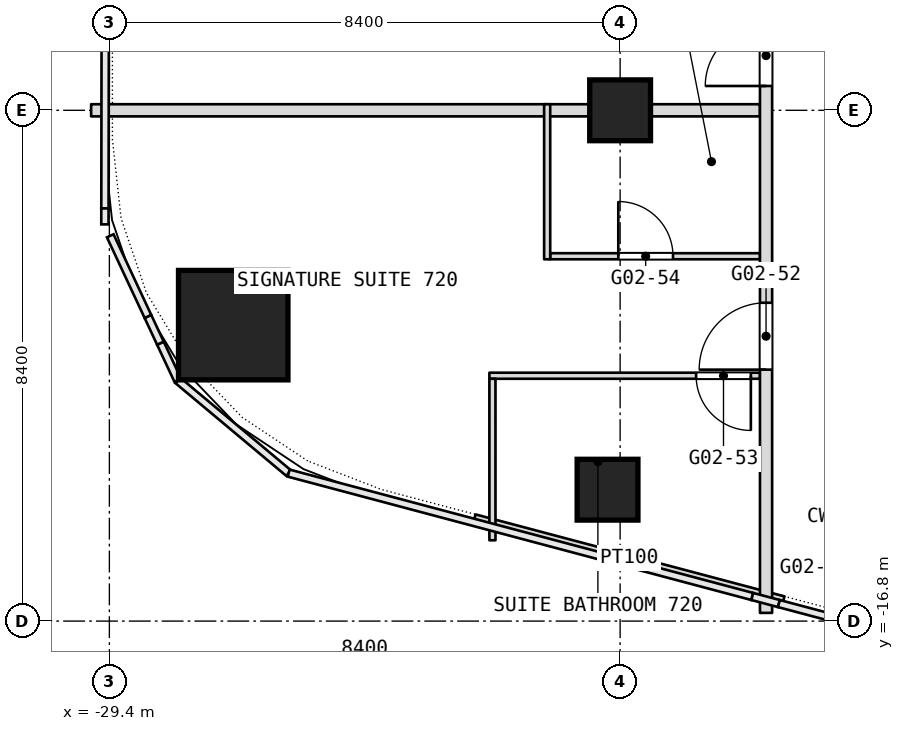
"""IFC4 building model, lengths in metres.
Left out: names, types, materials, properties, quantities, classifications, styles, units other than length and angle.
Written with IfcOpenShell. Run it as: python <this file> out.ifc"""

import sys

from ifc_helpers import new_model, si_unit, direction, frame, frame_2d, origin, origin_2d, place, context, subcontext, project, spatial, rectangle, extrude, element, fill, save


model = new_model("IFC4")
c1 = context("Model", 3, precision=1e-05, world=origin(), true_north=direction((0.0, 1.0)))
c2 = subcontext(c1, "Body", "Model", "MODEL_VIEW")
j1 = project(units=[si_unit("LENGTHUNIT", "METRE"), si_unit("PLANEANGLEUNIT", "RADIAN")], contexts=[c1])
p1 = place(None, origin())
s1 = spatial("IfcSite", under=j1, at=p1, CompositionType="ELEMENT")
p2 = place(p1, origin())
s2 = spatial("IfcBuilding", under=s1, at=p2, CompositionType="ELEMENT")
p3 = place(p2, frame((0.0, 0.0, 40.1)))
s3 = spatial("IfcBuildingStorey", under=s2, at=p3, CompositionType="ELEMENT", Elevation=40.1)
p4 = place(p3, frame((-27.363, -11.933, 0.0), z_axis=(0.0, 0.0, 1.0), x_axis=(1.0, 0.0, 0.0)))
e1 = element("IfcColumn", 1, at=p4, inside=s3, PredefinedType="COLUMN", context=c2, shape_type="SweptSolid", body=[
    extrude(rectangle(XDim=1.8, YDim=1.8, at=origin_2d()), origin(), (0.0, 0.0, 1.0), 3.6),
])
for number, where, z_axis, x_axis in (
    (2, (-21.0, -8.4, 0.0), (0.0, 0.0, 1.0), (1.0, 0.0, 0.0)),
    (3, (-21.207, -14.639, 0.0), (0.0, 0.0, 1.0), (1.0, 0.0, 0.0)),
):
    element("IfcColumn", number, at=place(p3, frame(where, z_axis=z_axis, x_axis=x_axis)), inside=s3, PredefinedType="COLUMN", context=c2, shape_type="SweptSolid", body=[
        extrude(rectangle(XDim=1.0, YDim=1.0, at=origin_2d()), origin(), (0.0, 0.0, 1.0), 3.6),
    ])
p5 = place(p3, frame((-23.39, -15.094, 0.0), z_axis=(0.0, 0.0, 1.0), x_axis=(0.966552628131, -0.256468354876, 0.0)))
e4 = element("IfcWall", 4, at=p5, inside=s3, PredefinedType="PARTITIONING", context=c2, shape_type="SweptSolid", body=[
    extrude(rectangle(XDim=5.256, YDim=0.1, at=frame_2d((2.628, 0.0))), origin(), (0.0, 0.0, 1.0), 3.34),
])
p6 = place(p3, frame((-23.15, -12.765, 0.0), z_axis=(0.0, 0.0, 1.0), x_axis=(1.0, 0.0, 0.0)))
e5 = element("IfcWall", 5, at=p6, inside=s3, PredefinedType="PARTITIONING", context=c2, shape_type="SweptSolid", body=[
    extrude(rectangle(XDim=4.45, YDim=0.1, at=frame_2d((2.225, 0.0))), origin(), (0.0, 0.0, 1.0), 3.34),
])
p7 = place(p6, frame((3.4, 0.0, 0.0)))
e6 = element("IfcOpeningElement", 6, at=p7, cuts=e5, PredefinedType="OPENING", context=c2, shape_type="SweptSolid", body=[
    extrude(rectangle(XDim=0.9, YDim=2.1, at=frame_2d((0.45, 1.05))), frame((0.0, 0.05, 0.0), z_axis=(0.0, -1.0, 0.0), x_axis=(1.0, 0.0, 0.0)), (0.0, 0.0, 1.0), 0.1),
])
p8 = place(p3, frame((-22.15, -10.8, 0.0), z_axis=(0.0, 0.0, 1.0), x_axis=(1.0, 0.0, 0.0)))
e7 = element("IfcWall", 7, at=p8, inside=s3, PredefinedType="PARTITIONING", context=c2, shape_type="SweptSolid", body=[
    extrude(rectangle(XDim=3.45, YDim=0.1, at=frame_2d((1.725, 0.0))), origin(), (0.0, 0.0, 1.0), 3.34),
])
p9 = place(p8, frame((1.12, 0.0, 0.0)))
e8 = element("IfcOpeningElement", 8, at=p9, cuts=e7, PredefinedType="OPENING", context=c2, shape_type="SweptSolid", body=[
    extrude(rectangle(XDim=0.9, YDim=2.1, at=frame_2d((0.45, 1.05))), frame((0.0, 0.05, 0.0), z_axis=(0.0, -1.0, 0.0), x_axis=(1.0, 0.0, 0.0)), (0.0, 0.0, 1.0), 0.1),
])
p10 = place(p3, frame((-29.7, -8.4, 0.0), z_axis=(0.0, 0.0, 1.0), x_axis=(1.0, 0.0, 0.0)))
e9 = element("IfcWall", 9, at=p10, inside=s3, PredefinedType="PARTITIONING", context=c2, shape_type="SweptSolid", body=[
    extrude(rectangle(XDim=11.0, YDim=0.2, at=frame_2d((5.5, 0.0))), origin(), (0.0, 0.0, 1.0), 2.84),
])
p11 = place(p3, frame((-18.6, -16.665, 0.0), z_axis=(0.0, 0.0, 1.0), x_axis=(0.0, 1.0, 0.0)))
e10 = element("IfcWall", 10, at=p11, inside=s3, PredefinedType="PARTITIONING", context=c2, shape_type="SweptSolid", body=[
    extrude(rectangle(XDim=23.565, YDim=0.2, at=frame_2d((11.782, 0.0))), origin(), (0.0, 0.0, 1.0), 3.34),
])
p12 = place(p11, frame((4.0, 0.0, 0.0)))
e11 = element("IfcOpeningElement", 11, at=p12, cuts=e10, PredefinedType="OPENING", context=c2, shape_type="SweptSolid", body=[
    extrude(rectangle(XDim=1.1, YDim=2.1, at=frame_2d((0.55, 1.05))), frame((0.0, 0.1, 0.0), z_axis=(0.0, -1.0, 0.0), x_axis=(1.0, 0.0, 0.0)), (0.0, 0.0, 1.0), 0.2),
])
p13 = place(p11, frame((8.665, 0.0, 0.0)))
e12 = element("IfcOpeningElement", 12, at=p13, cuts=e10, PredefinedType="OPENING", context=c2, shape_type="SweptSolid", body=[
    extrude(rectangle(XDim=1.0, YDim=2.1, at=frame_2d((0.5, 1.05))), frame((0.0, 0.1, 0.0), z_axis=(0.0, -1.0, 0.0), x_axis=(1.0, 0.0, 0.0)), (0.0, 0.0, 1.0), 0.2),
])
p14 = place(p11, frame((15.265, 0.0, 0.0)))
e13 = element("IfcOpeningElement", 13, at=p14, cuts=e10, PredefinedType="OPENING", context=c2, shape_type="SweptSolid", body=[
    extrude(rectangle(XDim=1.0, YDim=2.1, at=frame_2d((0.5, 1.05))), frame((0.0, 0.1, 0.0), z_axis=(0.0, -1.0, 0.0), x_axis=(1.0, 0.0, 0.0)), (0.0, 0.0, 1.0), 0.2),
])
p15 = place(p11, frame((19.465, 0.0, 0.0)))
e14 = element("IfcOpeningElement", 14, at=p15, cuts=e10, PredefinedType="OPENING", context=c2, shape_type="SweptSolid", body=[
    extrude(rectangle(XDim=1.0, YDim=2.1, at=frame_2d((0.5, 1.05))), frame((0.0, 0.1, 0.0), z_axis=(0.0, -1.0, 0.0), x_axis=(1.0, 0.0, 0.0)), (0.0, 0.0, 1.0), 0.2),
])
p16 = place(p3, frame((-22.2, -10.85, 0.0), z_axis=(0.0, 0.0, 1.0), x_axis=(0.0, 1.0, 0.0)))
e15 = element("IfcWall", 15, at=p16, inside=s3, PredefinedType="PARTITIONING", context=c2, shape_type="SweptSolid", body=[
    extrude(rectangle(XDim=2.55, YDim=0.1, at=frame_2d((1.275, 0.0))), origin(), (0.0, 0.0, 1.0), 3.34),
])
p17 = place(p3, frame((-23.1, -15.471, 0.0), z_axis=(0.0, 0.0, 1.0), x_axis=(0.0, 1.0, 0.0)))
e16 = element("IfcWall", 16, at=p17, inside=s3, PredefinedType="PARTITIONING", context=c2, shape_type="SweptSolid", body=[
    extrude(rectangle(XDim=2.656, YDim=0.1, at=frame_2d((1.328, 0.0))), origin(), (0.0, 0.0, 1.0), 3.34),
])
p18 = place(p7, origin())
e17 = element("IfcDoor", 17, at=p18, inside=s3, OperationType="SINGLE_SWING_LEFT", PredefinedType="DOOR", context=c2, shape_type="SweptSolid", body=[
    extrude(rectangle(XDim=0.9, YDim=2.1, at=frame_2d((0.45, 1.05))), frame((0.0, 0.025, 0.0), z_axis=(0.0, -1.0, 0.0), x_axis=(1.0, 0.0, 0.0)), (0.0, 0.0, 1.0), 0.05),
])
fill(e6, e17)
p19 = place(p9, origin())
e18 = element("IfcDoor", 18, at=p19, inside=s3, OperationType="SINGLE_SWING_LEFT", PredefinedType="DOOR", context=c2, shape_type="SweptSolid", body=[
    extrude(rectangle(XDim=0.9, YDim=2.1, at=frame_2d((0.45, 1.05))), frame((0.0, 0.025, 0.0), z_axis=(0.0, -1.0, 0.0), x_axis=(1.0, 0.0, 0.0)), (0.0, 0.0, 1.0), 0.05),
])
fill(e8, e18)
p20 = place(p12, origin())
e19 = element("IfcDoor", 19, at=p20, inside=s3, OperationType="SINGLE_SWING_LEFT", PredefinedType="DOOR", context=c2, shape_type="SweptSolid", body=[
    extrude(rectangle(XDim=1.1, YDim=2.1, at=frame_2d((0.55, 1.05))), frame((0.0, 0.025, 0.0), z_axis=(0.0, -1.0, 0.0), x_axis=(1.0, 0.0, 0.0)), (0.0, 0.0, 1.0), 0.05),
])
fill(e11, e19)
p21 = place(p13, origin())
e20 = element("IfcDoor", 20, at=p21, inside=s3, OperationType="SINGLE_SWING_RIGHT", PredefinedType="DOOR", context=c2, shape_type="SweptSolid", body=[
    extrude(rectangle(XDim=1.0, YDim=2.1, at=frame_2d((0.5, 1.05))), frame((0.0, 0.025, 0.0), z_axis=(0.0, -1.0, 0.0), x_axis=(1.0, 0.0, 0.0)), (0.0, 0.0, 1.0), 0.05),
])
fill(e12, e20)
save(model, sys.argv[1])
